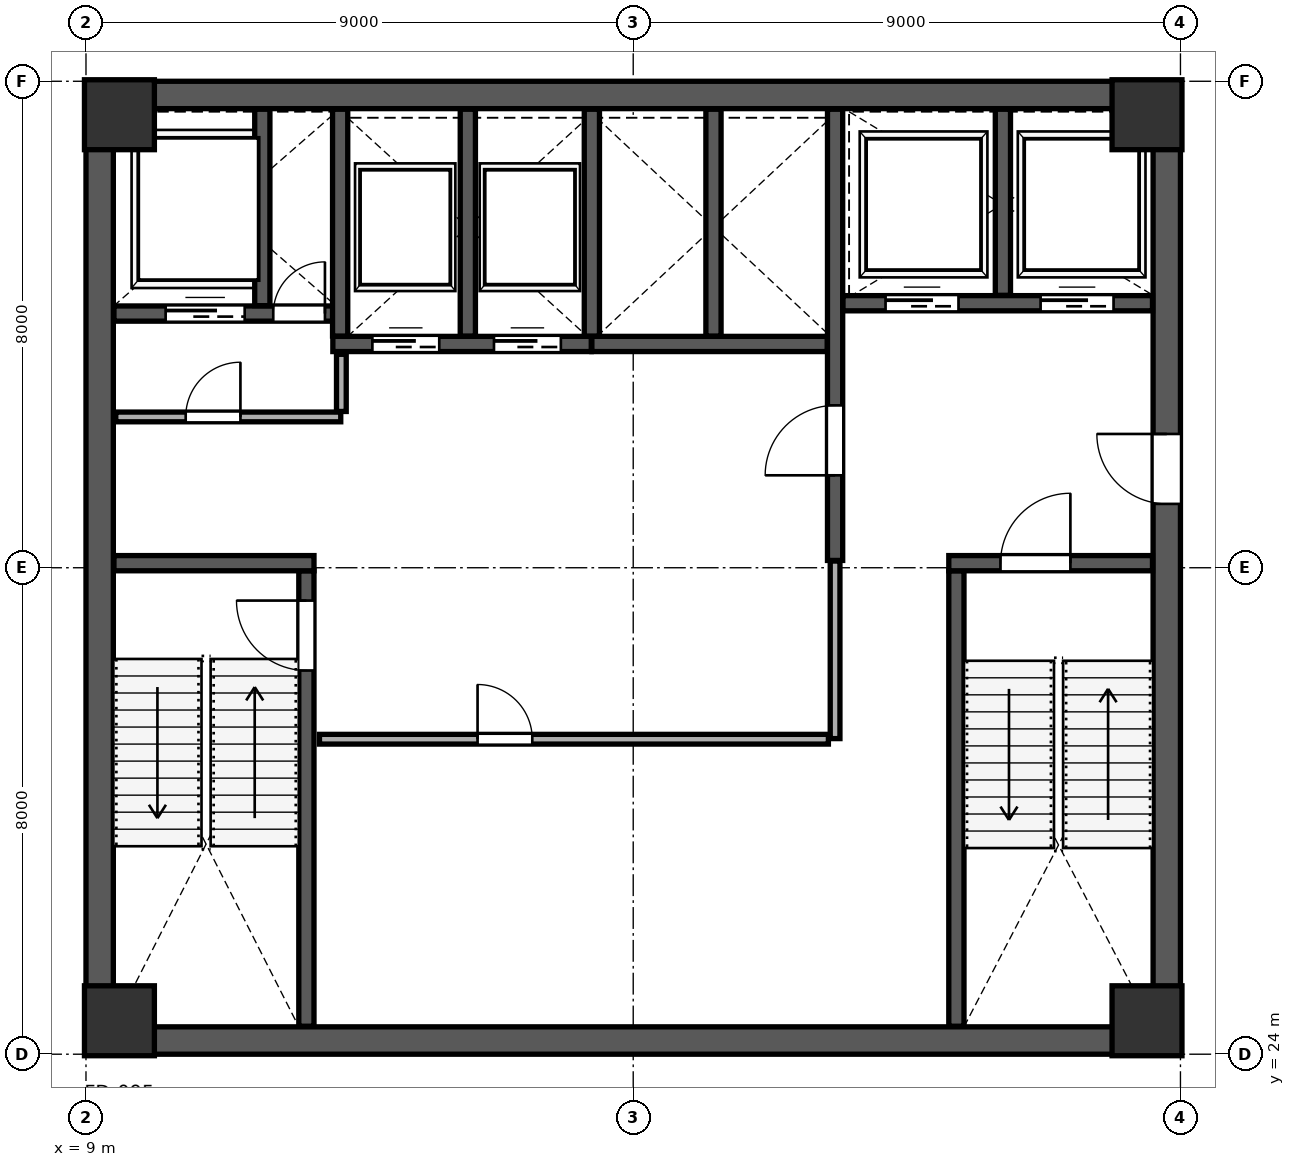
"""IFC4 building model, lengths in metres.
Left out: names, types, materials, properties, quantities, classifications, styles, units other than length and angle.
Written with IfcOpenShell. Run it as: python <this file> out.ifc"""

import sys

from ifc_helpers import new_model, si_unit, direction, frame, frame_2d, origin, origin_2d, place, context, subcontext, project, spatial, rectangle, extrude, source, transform, mapped, element, fill, save


model = new_model("IFC4")
c1 = context("Model", 3, precision=1e-05, world=origin(), true_north=direction((0.0, 1.0)))
c2 = subcontext(c1, "Body", "Model", "MODEL_VIEW")
j1 = project(units=[si_unit("LENGTHUNIT", "METRE"), si_unit("PLANEANGLEUNIT", "RADIAN")], contexts=[c1])
p1 = place(None, origin())
s1 = spatial("IfcSite", under=j1, at=p1, CompositionType="ELEMENT")
p2 = place(p1, origin())
s2 = spatial("IfcBuilding", under=s1, at=p2, CompositionType="ELEMENT")
p3 = place(p2, frame((0.0, 0.0, 145.6)))
s3 = spatial("IfcBuildingStorey", under=s2, at=p3, CompositionType="ELEMENT", Elevation=145.6)
m1 = source(origin(), c2, "Body", "SweptSolid", [
    extrude(rectangle(XDim=1.15, YDim=1.15, at=origin_2d()), origin(), (0.0, 0.0, 1.0), 4.198),
])
for number, where, z_axis, x_axis in (
    (1, (9.55, 24.55, 0.001), (0.0, 0.0, 1.0), (1.0, 0.0, 0.0)),
    (2, (26.45, 24.55, 0.001), (0.0, 0.0, 1.0), (1.0, 0.0, 0.0)),
    (3, (9.55, 39.45, 0.001), (0.0, 0.0, 1.0), (1.0, 0.0, 0.0)),
    (4, (26.45, 39.45, 0.001), (0.0, 0.0, 1.0), (1.0, 0.0, 0.0)),
):
    element("IfcColumn", number, at=place(p3, frame(where, z_axis=z_axis, x_axis=x_axis)), inside=s3, PredefinedType="COLUMN", context=c2, shape_type="MappedRepresentation", body=[
        mapped(m1, transform((0.0, 0.0, 0.0), scale=1.0)),
    ])
p4 = place(p3, frame((9.225, 24.45, 0.0), z_axis=(0.0, 0.0, 1.0), x_axis=(0.0, 1.0, 0.0)))
e5 = element("IfcWall", 5, at=p4, inside=s3, PredefinedType="SHEAR", context=c2, shape_type="SweptSolid", body=[
    extrude(rectangle(XDim=15.1, YDim=0.45, at=frame_2d((7.55, 0.0))), origin(), (0.0, 0.0, 1.0), 3.96),
])
p5 = place(p3, frame((26.775, 24.45, 0.0), z_axis=(0.0, 0.0, 1.0), x_axis=(0.0, 1.0, 0.0)))
e6 = element("IfcWall", 6, at=p5, inside=s3, PredefinedType="SHEAR", context=c2, shape_type="SweptSolid", body=[
    extrude(rectangle(XDim=15.1, YDim=0.45, at=frame_2d((7.55, 0.0))), origin(), (0.0, 0.0, 1.0), 3.96),
])
p6 = place(p5, frame((8.6, 0.0, 0.0)))
e7 = element("IfcOpeningElement", 7, at=p6, cuts=e6, PredefinedType="OPENING", context=c2, shape_type="SweptSolid", body=[
    extrude(rectangle(XDim=1.15, YDim=2.2, at=frame_2d((0.575, 1.1))), frame((0.0, 0.235, 0.0), z_axis=(0.0, -1.0, 0.0), x_axis=(1.0, 0.0, 0.0)), (0.0, 0.0, 1.0), 0.47),
])
for number, where, z_axis, x_axis in (
    (8, (9.0, 24.225, 0.0), (0.0, 0.0, 1.0), (1.0, 0.0, 0.0)),
    (9, (9.0, 39.775, 0.0), (0.0, 0.0, 1.0), (1.0, 0.0, 0.0)),
):
    element("IfcWall", number, at=place(p3, frame(where, z_axis=z_axis, x_axis=x_axis)), inside=s3, PredefinedType="SHEAR", context=c2, shape_type="SweptSolid", body=[
        extrude(rectangle(XDim=18.0, YDim=0.45, at=frame_2d((9.0, 0.0))), origin(), (0.0, 0.0, 1.0), 3.96),
    ])
p7 = place(p3, frame((12.625, 24.46, 0.0), z_axis=(0.0, 0.0, 1.0), x_axis=(0.0, 1.0, 0.0)))
e10 = element("IfcWall", 10, at=p7, inside=s3, PredefinedType="SHEAR", context=c2, shape_type="SweptSolid", body=[
    extrude(rectangle(XDim=7.49, YDim=0.25, at=frame_2d((3.745, 0.0))), origin(), (0.0, 0.0, 1.0), 3.96),
])
p8 = place(p7, frame((5.85, 0.0, 0.0)))
e11 = element("IfcOpeningElement", 11, at=p8, cuts=e10, PredefinedType="OPENING", context=c2, shape_type="SweptSolid", body=[
    extrude(rectangle(XDim=1.15, YDim=2.2, at=frame_2d((0.575, 1.1))), frame((0.0, 0.135, 0.0), z_axis=(0.0, -1.0, 0.0), x_axis=(1.0, 0.0, 0.0)), (0.0, 0.0, 1.0), 0.27),
])
p9 = place(p3, frame((9.46, 32.075, 0.0), z_axis=(0.0, 0.0, 1.0), x_axis=(1.0, 0.0, 0.0)))
e12 = element("IfcWall", 12, at=p9, inside=s3, PredefinedType="SHEAR", context=c2, shape_type="SweptSolid", body=[
    extrude(rectangle(XDim=3.29, YDim=0.25, at=frame_2d((1.645, 0.0))), origin(), (0.0, 0.0, 1.0), 3.96),
])
p10 = place(p3, frame((23.315, 24.46, 0.0), z_axis=(0.0, 0.0, 1.0), x_axis=(0.0, 1.0, 0.0)))
e13 = element("IfcWall", 13, at=p10, inside=s3, PredefinedType="SHEAR", context=c2, shape_type="SweptSolid", body=[
    extrude(rectangle(XDim=7.49, YDim=0.25, at=frame_2d((3.745, 0.0))), origin(), (0.0, 0.0, 1.0), 3.96),
])
p11 = place(p3, frame((23.19, 32.075, 0.0), z_axis=(0.0, 0.0, 1.0), x_axis=(1.0, 0.0, 0.0)))
e14 = element("IfcWall", 14, at=p11, inside=s3, PredefinedType="SHEAR", context=c2, shape_type="SweptSolid", body=[
    extrude(rectangle(XDim=3.35, YDim=0.25, at=frame_2d((1.675, 0.0))), origin(), (0.0, 0.0, 1.0), 3.96),
])
p12 = place(p11, frame((0.85, 0.0, 0.0)))
e15 = element("IfcOpeningElement", 15, at=p12, cuts=e14, PredefinedType="OPENING", context=c2, shape_type="SweptSolid", body=[
    extrude(rectangle(XDim=1.15, YDim=2.2, at=frame_2d((0.575, 1.1))), frame((0.0, 0.135, 0.0), z_axis=(0.0, -1.0, 0.0), x_axis=(1.0, 0.0, 0.0)), (0.0, 0.0, 1.0), 0.27),
])
p13 = place(p3, frame((21.32, 32.12, 0.0), z_axis=(0.0, 0.0, 1.0), x_axis=(0.0, 1.0, 0.0)))
e16 = element("IfcWall", 16, at=p13, inside=s3, PredefinedType="SHEAR", context=c2, shape_type="SweptSolid", body=[
    extrude(rectangle(XDim=7.42, YDim=0.25, at=frame_2d((3.71, 0.0))), origin(), (0.0, 0.0, 1.0), 3.96),
])
p14 = place(p13, frame((1.4, 0.0, 0.0)))
e17 = element("IfcOpeningElement", 17, at=p14, cuts=e16, PredefinedType="OPENING", context=c2, shape_type="SweptSolid", body=[
    extrude(rectangle(XDim=1.15, YDim=2.2, at=frame_2d((0.575, 1.1))), frame((0.0, 0.135, 0.0), z_axis=(0.0, -1.0, 0.0), x_axis=(1.0, 0.0, 0.0)), (0.0, 0.0, 1.0), 0.27),
])
p15 = place(p3, frame((9.46, 36.18, 0.0), z_axis=(0.0, 0.0, 1.0), x_axis=(1.0, 0.0, 0.0)))
e18 = element("IfcWall", 18, at=p15, inside=s3, PredefinedType="SHEAR", context=c2, shape_type="SweptSolid", body=[
    extrude(rectangle(XDim=3.79, YDim=0.25, at=frame_2d((1.895, 0.0))), origin(), (0.0, 0.0, 1.0), 3.96),
])
p16 = place(p15, frame((2.62, 0.0, 0.0)))
e19 = element("IfcOpeningElement", 19, at=p16, cuts=e18, PredefinedType="OPENING", context=c2, shape_type="SweptSolid", body=[
    extrude(rectangle(XDim=0.85, YDim=2.1, at=frame_2d((0.425, 1.05))), frame((0.0, 0.135, 0.0), z_axis=(0.0, -1.0, 0.0), x_axis=(1.0, 0.0, 0.0)), (0.0, 0.0, 1.0), 0.27),
])
p17 = place(p15, frame((0.85, 0.0, 0.0)))
e20 = element("IfcOpeningElement", 20, at=p17, cuts=e18, PredefinedType="OPENING", context=c2, shape_type="SweptSolid", body=[
    extrude(rectangle(XDim=1.3, YDim=2.25, at=frame_2d((0.65, 1.125))), frame((0.0, 0.135, 0.0), z_axis=(0.0, -1.0, 0.0), x_axis=(1.0, 0.0, 0.0)), (0.0, 0.0, 1.0), 0.27),
])
p18 = place(p3, frame((11.9, 36.31, 0.0), z_axis=(0.0, 0.0, 1.0), x_axis=(0.0, 1.0, 0.0)))
e21 = element("IfcWall", 21, at=p18, inside=s3, PredefinedType="SHEAR", context=c2, shape_type="SweptSolid", body=[
    extrude(rectangle(XDim=3.23, YDim=0.25, at=frame_2d((1.615, 0.0))), origin(), (0.0, 0.0, 1.0), 3.96),
])
p19 = place(p3, frame((21.45, 36.35, 0.0), z_axis=(0.0, 0.0, 1.0), x_axis=(1.0, 0.0, 0.0)))
e22 = element("IfcWall", 22, at=p19, inside=s3, PredefinedType="SHEAR", context=c2, shape_type="SweptSolid", body=[
    extrude(rectangle(XDim=5.09, YDim=0.25, at=frame_2d((2.545, 0.0))), origin(), (0.0, 0.0, 1.0), 3.96),
])
p20 = place(p19, frame((0.7, 0.0, 0.0)))
e23 = element("IfcOpeningElement", 23, at=p20, cuts=e22, PredefinedType="OPENING", context=c2, shape_type="SweptSolid", body=[
    extrude(rectangle(XDim=1.2, YDim=2.2, at=frame_2d((0.6, 1.1))), frame((0.0, 0.135, 0.0), z_axis=(0.0, -1.0, 0.0), x_axis=(1.0, 0.0, 0.0)), (0.0, 0.0, 1.0), 0.27),
])
p21 = place(p19, frame((3.25, 0.0, 0.0)))
e24 = element("IfcOpeningElement", 24, at=p21, cuts=e22, PredefinedType="OPENING", context=c2, shape_type="SweptSolid", body=[
    extrude(rectangle(XDim=1.2, YDim=2.2, at=frame_2d((0.6, 1.1))), frame((0.0, 0.135, 0.0), z_axis=(0.0, -1.0, 0.0), x_axis=(1.0, 0.0, 0.0)), (0.0, 0.0, 1.0), 0.27),
])
p22 = place(p3, frame((24.08, 36.48, 0.0), z_axis=(0.0, 0.0, 1.0), x_axis=(0.0, 1.0, 0.0)))
e25 = element("IfcWall", 25, at=p22, inside=s3, PredefinedType="SHEAR", context=c2, shape_type="SweptSolid", body=[
    extrude(rectangle(XDim=3.06, YDim=0.25, at=frame_2d((1.53, 0.0))), origin(), (0.0, 0.0, 1.0), 3.96),
])
p23 = place(p3, frame((13.06, 35.68, 0.0), z_axis=(0.0, 0.0, 1.0), x_axis=(1.0, 0.0, 0.0)))
e26 = element("IfcWall", 26, at=p23, inside=s3, PredefinedType="SHEAR", context=c2, shape_type="SweptSolid", body=[
    extrude(rectangle(XDim=4.25, YDim=0.25, at=frame_2d((2.125, 0.0))), origin(), (0.0, 0.0, 1.0), 3.96),
])
p24 = place(p23, frame((0.65, 0.0, 0.0)))
e27 = element("IfcOpeningElement", 27, at=p24, cuts=e26, PredefinedType="OPENING", context=c2, shape_type="SweptSolid", body=[
    extrude(rectangle(XDim=1.1, YDim=2.2, at=frame_2d((0.55, 1.1))), frame((0.0, 0.135, 0.0), z_axis=(0.0, -1.0, 0.0), x_axis=(1.0, 0.0, 0.0)), (0.0, 0.0, 1.0), 0.27),
])
p25 = place(p23, frame((2.65, 0.0, 0.0)))
e28 = element("IfcOpeningElement", 28, at=p25, cuts=e26, PredefinedType="OPENING", context=c2, shape_type="SweptSolid", body=[
    extrude(rectangle(XDim=1.1, YDim=2.2, at=frame_2d((0.55, 1.1))), frame((0.0, 0.135, 0.0), z_axis=(0.0, -1.0, 0.0), x_axis=(1.0, 0.0, 0.0)), (0.0, 0.0, 1.0), 0.27),
])
for number, where, z_axis, x_axis in (
    (29, (13.18, 35.81, 0.0), (0.0, 0.0, 1.0), (0.0, 1.0, 0.0)),
    (30, (15.28, 35.81, 0.0), (0.0, 0.0, 1.0), (0.0, 1.0, 0.0)),
):
    element("IfcWall", number, at=place(p3, frame(where, z_axis=z_axis, x_axis=x_axis)), inside=s3, PredefinedType="SHEAR", context=c2, shape_type="SweptSolid", body=[
        extrude(rectangle(XDim=3.73, YDim=0.25, at=frame_2d((1.865, 0.0))), origin(), (0.0, 0.0, 1.0), 3.96),
    ])
p26 = place(p3, frame((17.32, 35.68, 0.0), z_axis=(0.0, 0.0, 1.0), x_axis=(1.0, 0.0, 0.0)))
e31 = element("IfcWall", 31, at=p26, inside=s3, PredefinedType="SHEAR", context=c2, shape_type="SweptSolid", body=[
    extrude(rectangle(XDim=3.87, YDim=0.25, at=frame_2d((1.935, 0.0))), origin(), (0.0, 0.0, 1.0), 3.96),
])
for number, where, z_axis, x_axis in (
    (32, (17.32, 35.81, 0.0), (0.0, 0.0, 1.0), (0.0, 1.0, 0.0)),
    (33, (19.32, 35.81, 0.0), (0.0, 0.0, 1.0), (0.0, 1.0, 0.0)),
):
    element("IfcWall", number, at=place(p3, frame(where, z_axis=z_axis, x_axis=x_axis)), inside=s3, PredefinedType="SHEAR", context=c2, shape_type="SweptSolid", body=[
        extrude(rectangle(XDim=3.73, YDim=0.25, at=frame_2d((1.865, 0.0))), origin(), (0.0, 0.0, 1.0), 3.96),
    ])
p27 = place(p3, frame((9.49, 34.48, 0.0), z_axis=(0.0, 0.0, 1.0), x_axis=(1.0, 0.0, 0.0)))
e34 = element("IfcWall", 34, at=p27, inside=s3, PredefinedType="PARTITIONING", context=c2, shape_type="SweptSolid", body=[
    extrude(rectangle(XDim=3.7, YDim=0.16, at=frame_2d((1.85, 0.0))), origin(), (0.0, 0.0, 1.0), 3.96),
])
p28 = place(p27, frame((1.15, 0.0, 0.0)))
e35 = element("IfcOpeningElement", 35, at=p28, cuts=e34, PredefinedType="OPENING", context=c2, shape_type="SweptSolid", body=[
    extrude(rectangle(XDim=0.9, YDim=2.15, at=frame_2d((0.45, 1.075))), frame((0.0, 0.09, 0.0), z_axis=(0.0, -1.0, 0.0), x_axis=(1.0, 0.0, 0.0)), (0.0, 0.0, 1.0), 0.18),
])
p29 = place(p3, frame((13.2, 34.57, 0.0), z_axis=(0.0, 0.0, 1.0), x_axis=(0.0, 1.0, 0.0)))
e36 = element("IfcWall", 36, at=p29, inside=s3, PredefinedType="PARTITIONING", context=c2, shape_type="SweptSolid", body=[
    extrude(rectangle(XDim=0.94, YDim=0.16, at=frame_2d((0.47, 0.0))), origin(), (0.0, 0.0, 1.0), 3.96),
])
p30 = place(p3, frame((12.84, 29.18, 0.0), z_axis=(0.0, 0.0, 1.0), x_axis=(1.0, 0.0, 0.0)))
e37 = element("IfcWall", 37, at=p30, inside=s3, PredefinedType="PARTITIONING", context=c2, shape_type="SweptSolid", body=[
    extrude(rectangle(XDim=8.37, YDim=0.16, at=frame_2d((4.185, 0.0))), origin(), (0.0, 0.0, 1.0), 3.96),
])
p31 = place(p30, frame((2.6, 0.0, 0.0)))
e38 = element("IfcOpeningElement", 38, at=p31, cuts=e37, PredefinedType="OPENING", context=c2, shape_type="SweptSolid", body=[
    extrude(rectangle(XDim=0.9, YDim=2.15, at=frame_2d((0.45, 1.075))), frame((0.0, 0.09, 0.0), z_axis=(0.0, -1.0, 0.0), x_axis=(1.0, 0.0, 0.0)), (0.0, 0.0, 1.0), 0.18),
])
p32 = place(p3, frame((21.32, 29.19, 0.0), z_axis=(0.0, 0.0, 1.0), x_axis=(0.0, 1.0, 0.0)))
e39 = element("IfcWall", 39, at=p32, inside=s3, PredefinedType="PARTITIONING", context=c2, shape_type="SweptSolid", body=[
    extrude(rectangle(XDim=2.92, YDim=0.16, at=frame_2d((1.46, 0.0))), origin(), (0.0, 0.0, 1.0), 3.96),
])
p33 = place(p3, frame((9.523, 48.867, 0.0), z_axis=(0.0, 0.0, 1.0), x_axis=(0.923882225555, -0.382676930718, 0.0)))
e40 = element("IfcWall", 40, at=p33, inside=s3, PredefinedType="PARTITIONING", context=c2, shape_type="SweptSolid", body=[
    extrude(rectangle(XDim=27.61, YDim=0.115, at=frame_2d((13.805, 0.0))), origin(), (0.0, 0.0, 1.0), 3.96),
])
p34 = place(p33, frame((20.31, 0.0, 0.0)))
e41 = element("IfcOpeningElement", 41, at=p34, cuts=e40, PredefinedType="OPENING", context=c2, shape_type="SweptSolid", body=[
    extrude(rectangle(XDim=0.95, YDim=2.15, at=frame_2d((0.475, 1.075))), frame((0.0, 0.067, 0.0), z_axis=(0.0, -1.0, 0.0), x_axis=(1.0, 0.0, 0.0)), (0.0, 0.0, 1.0), 0.135),
])
p35 = place(p3, frame((23.963, 11.475, 0.0), z_axis=(0.0, 0.0, 1.0), x_axis=(0.382686018031, 0.923878461489, 0.0)))
e42 = element("IfcWall", 42, at=p35, inside=s3, PredefinedType="PARTITIONING", context=c2, shape_type="SweptSolid", body=[
    extrude(rectangle(XDim=14.58, YDim=0.16, at=frame_2d((7.29, 0.0))), origin(), (0.0, 0.0, 1.0), 3.96),
])
m2 = source(origin(), c2, "Body", "SweptSolid", [
    extrude(rectangle(XDim=1.15, YDim=2.2, at=frame_2d((0.575, 1.1))), frame((0.0, 0.025, 0.0), z_axis=(0.0, -1.0, 0.0), x_axis=(1.0, 0.0, 0.0)), (0.0, 0.0, 1.0), 0.05),
])
p36 = place(p8, origin())
e43 = element("IfcDoor", 43, at=p36, inside=s3, OperationType="SINGLE_SWING_RIGHT", PredefinedType="DOOR", context=c2, shape_type="MappedRepresentation", body=[
    mapped(m2, transform((0.0, 0.0, 0.0), scale=1.0)),
])
fill(e11, e43)
m3 = source(origin(), c2, "Body", "SweptSolid", [
    extrude(rectangle(XDim=1.15, YDim=2.2, at=frame_2d((0.575, 1.1))), frame((0.0, 0.025, 0.0), z_axis=(0.0, -1.0, 0.0), x_axis=(1.0, 0.0, 0.0)), (0.0, 0.0, 1.0), 0.05),
])
p37 = place(p14, origin())
e44 = element("IfcDoor", 44, at=p37, inside=s3, OperationType="SINGLE_SWING_LEFT", PredefinedType="DOOR", context=c2, shape_type="MappedRepresentation", body=[
    mapped(m3, transform((0.0, 0.0, 0.0), scale=1.0)),
])
fill(e17, e44)
p38 = place(p12, origin())
e45 = element("IfcDoor", 45, at=p38, inside=s3, OperationType="SINGLE_SWING_RIGHT", PredefinedType="DOOR", context=c2, shape_type="MappedRepresentation", body=[
    mapped(m2, transform((0.0, 0.0, 0.0), scale=1.0)),
])
fill(e15, e45)
p39 = place(p6, origin())
e46 = element("IfcDoor", 46, at=p39, inside=s3, OperationType="SINGLE_SWING_RIGHT", PredefinedType="DOOR", context=c2, shape_type="MappedRepresentation", body=[
    mapped(m3, transform((0.0, 0.0, 0.0), scale=1.0)),
])
fill(e7, e46)
m4 = source(origin(), c2, "Body", "SweptSolid", [
    extrude(rectangle(XDim=0.85, YDim=2.1, at=frame_2d((0.425, 1.05))), frame((0.0, 0.025, 0.0), z_axis=(0.0, -1.0, 0.0), x_axis=(1.0, 0.0, 0.0)), (0.0, 0.0, 1.0), 0.05),
])
p40 = place(p16, origin())
e47 = element("IfcDoor", 47, at=p40, inside=s3, OperationType="SINGLE_SWING_RIGHT", PredefinedType="DOOR", context=c2, shape_type="MappedRepresentation", body=[
    mapped(m4, transform((0.0, 0.0, 0.0), scale=1.0)),
])
fill(e19, e47)
m5 = source(origin(), c2, "Body", "SweptSolid", [
    extrude(rectangle(XDim=1.1, YDim=2.2, at=frame_2d((0.55, 1.1))), frame((0.0, 0.025, 0.0), z_axis=(0.0, -1.0, 0.0), x_axis=(1.0, 0.0, 0.0)), (0.0, 0.0, 1.0), 0.05),
])
p41 = place(p24, origin())
e48 = element("IfcDoor", 48, at=p41, inside=s3, OperationType="SLIDING_TO_LEFT", PredefinedType="DOOR", context=c2, shape_type="MappedRepresentation", body=[
    mapped(m5, transform((0.0, 0.0, 0.0), scale=1.0)),
])
fill(e27, e48)
p42 = place(p25, origin())
e49 = element("IfcDoor", 49, at=p42, inside=s3, OperationType="SLIDING_TO_RIGHT", PredefinedType="DOOR", context=c2, shape_type="MappedRepresentation", body=[
    mapped(m5, transform((0.0, 0.0, 0.0), scale=1.0)),
])
fill(e28, e49)
m6 = source(origin(), c2, "Body", "SweptSolid", [
    extrude(rectangle(XDim=1.2, YDim=2.2, at=frame_2d((0.6, 1.1))), frame((0.0, 0.025, 0.0), z_axis=(0.0, -1.0, 0.0), x_axis=(1.0, 0.0, 0.0)), (0.0, 0.0, 1.0), 0.05),
])
p43 = place(p20, origin())
e50 = element("IfcDoor", 50, at=p43, inside=s3, OperationType="SLIDING_TO_LEFT", PredefinedType="DOOR", context=c2, shape_type="MappedRepresentation", body=[
    mapped(m6, transform((0.0, 0.0, 0.0), scale=1.0)),
])
fill(e23, e50)
p44 = place(p21, origin())
e51 = element("IfcDoor", 51, at=p44, inside=s3, OperationType="SLIDING_TO_RIGHT", PredefinedType="DOOR", context=c2, shape_type="MappedRepresentation", body=[
    mapped(m6, transform((0.0, 0.0, 0.0), scale=1.0)),
])
fill(e24, e51)
m7 = source(origin(), c2, "Body", "SweptSolid", [
    extrude(rectangle(XDim=1.3, YDim=2.25, at=frame_2d((0.65, 1.125))), frame((0.0, 0.025, 0.0), z_axis=(0.0, -1.0, 0.0), x_axis=(1.0, 0.0, 0.0)), (0.0, 0.0, 1.0), 0.05),
])
p45 = place(p17, origin())
e52 = element("IfcDoor", 52, at=p45, inside=s3, OperationType="SLIDING_TO_LEFT", PredefinedType="DOOR", context=c2, shape_type="MappedRepresentation", body=[
    mapped(m7, transform((0.0, 0.0, 0.0), scale=1.0)),
])
fill(e20, e52)
m8 = source(origin(), c2, "Body", "SweptSolid", [
    extrude(rectangle(XDim=0.9, YDim=2.15, at=frame_2d((0.45, 1.075))), frame((0.0, 0.025, 0.0), z_axis=(0.0, -1.0, 0.0), x_axis=(1.0, 0.0, 0.0)), (0.0, 0.0, 1.0), 0.05),
])
p46 = place(p28, origin())
e53 = element("IfcDoor", 53, at=p46, inside=s3, OperationType="SINGLE_SWING_RIGHT", PredefinedType="DOOR", context=c2, shape_type="MappedRepresentation", body=[
    mapped(m8, transform((0.0, 0.0, 0.0), scale=1.0)),
])
fill(e35, e53)
p47 = place(p31, origin())
e54 = element("IfcDoor", 54, at=p47, inside=s3, OperationType="SINGLE_SWING_LEFT", PredefinedType="DOOR", context=c2, shape_type="MappedRepresentation", body=[
    mapped(m8, transform((0.0, 0.0, 0.0), scale=1.0)),
])
fill(e38, e54)
save(model, sys.argv[1])
